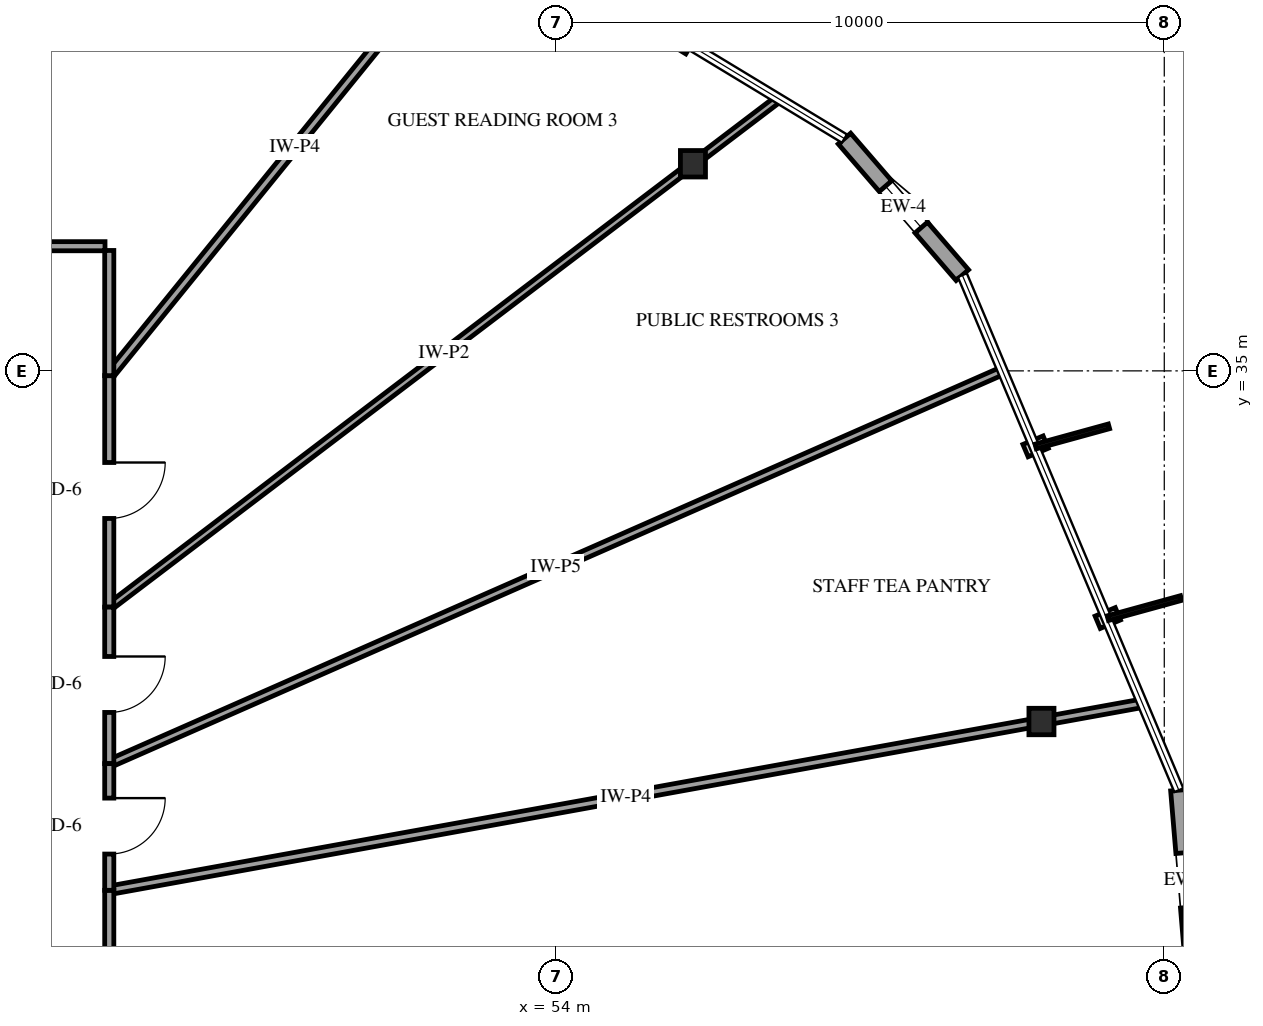
"""IFC4 building model, lengths in metres.
Left out: names, types, materials, properties, quantities, classifications, styles, units other than length and angle.
Written with IfcOpenShell. Run it as: python <this file> out.ifc"""

import sys

from ifc_helpers import new_model, si_unit, direction, frame, frame_2d, origin, origin_2d, place, context, subcontext, project, spatial, rectangle, i_section, extrude, element, fill, save


model = new_model("IFC4")
c1 = context("Model", 3, precision=1e-05, world=origin(), true_north=direction((0.0, 1.0)))
c2 = subcontext(c1, "Body", "Model", "MODEL_VIEW")
j1 = project(units=[si_unit("LENGTHUNIT", "METRE"), si_unit("PLANEANGLEUNIT", "RADIAN")], contexts=[c1])
p1 = place(None, origin())
s1 = spatial("IfcSite", under=j1, at=p1, CompositionType="ELEMENT")
p2 = place(p1, origin())
s2 = spatial("IfcBuilding", under=s1, at=p2, CompositionType="ELEMENT")
p3 = place(p2, frame((0.0, 0.0, 182.2)))
s3 = spatial("IfcBuildingStorey", under=s2, at=p3, CompositionType="ELEMENT", Elevation=182.2)
for number, where, z_axis, x_axis in (
    (1, (61.98, 29.234, 0.0), (0.0, 0.0, 1.0), (1.0, 0.0, 0.0)),
    (2, (56.249, 38.406, 0.0), (0.0, 0.0, 1.0), (1.0, 0.0, 0.0)),
):
    element("IfcColumn", number, at=place(p3, frame(where, z_axis=z_axis, x_axis=x_axis)), inside=s3, PredefinedType="COLUMN", context=c2, shape_type="SweptSolid", body=[
        extrude(i_section(OverallWidth=0.412, OverallDepth=0.435, WebThickness=0.036, FlangeThickness=0.057, FilletRadius=0.038, at=origin_2d()), origin(), (0.0, 0.0, 1.0), 3.6),
    ])
p4 = place(p3, frame((64.488, 25.148, 0.0), z_axis=(0.0, 0.0, 1.0), x_axis=(-0.083699323031, 0.996491055316, 0.0)))
e3 = element("IfcWall", 3, at=p4, inside=s3, PredefinedType="SOLIDWALL", context=c2, shape_type="SweptSolid", body=[
    extrude(rectangle(XDim=2.967, YDim=0.27, at=frame_2d((1.483, 0.0))), origin(), (0.0, 0.0, 1.0), 2.639),
])
p5 = place(p4, frame((1.033, 0.0, 0.75)))
e4 = element("IfcOpeningElement", 4, at=p5, cuts=e3, PredefinedType="OPENING", context=c2, shape_type="SweptSolid", body=[
    extrude(rectangle(XDim=0.9, YDim=1.5, at=frame_2d((0.45, 0.75))), frame((0.0, 0.145, 0.0), z_axis=(0.0, -1.0, 0.0), x_axis=(1.0, 0.0, 0.0)), (0.0, 0.0, 1.0), 0.29),
])
p6 = place(p3, frame((60.679, 36.574, 0.0), z_axis=(0.0, 0.0, 1.0), x_axis=(-0.653444154336, 0.756974726899, 0.0)))
e5 = element("IfcWall", 5, at=p6, inside=s3, PredefinedType="SOLIDWALL", context=c2, shape_type="SweptSolid", body=[
    extrude(rectangle(XDim=2.967, YDim=0.27, at=frame_2d((1.483, 0.0))), origin(), (0.0, 0.0, 1.0), 2.639),
])
p7 = place(p6, frame((1.033, 0.0, 0.75)))
e6 = element("IfcOpeningElement", 6, at=p7, cuts=e5, PredefinedType="OPENING", context=c2, shape_type="SweptSolid", body=[
    extrude(rectangle(XDim=0.9, YDim=1.5, at=frame_2d((0.45, 0.75))), frame((0.0, 0.145, 0.0), z_axis=(0.0, -1.0, 0.0), x_axis=(1.0, 0.0, 0.0)), (0.0, 0.0, 1.0), 0.29),
])
p8 = place(p3, frame((63.639, 29.534, 0.0), z_axis=(0.0, 0.0, 1.0), x_axis=(-0.984001996819, -0.1781574311, 0.0)))
e7 = element("IfcWall", 7, at=p8, inside=s3, PredefinedType="PARTITIONING", context=c2, shape_type="SweptSolid", body=[
    extrude(rectangle(XDim=17.265, YDim=0.14, at=frame_2d((8.633, 0.0))), origin(), (0.0, 0.0, 1.0), 2.555),
])
p9 = place(p3, frame((46.65, 28.541, 0.0), z_axis=(0.0, 0.0, 1.0), x_axis=(0.915378055005, 0.402595350712, 0.0)))
e8 = element("IfcWall", 8, at=p9, inside=s3, PredefinedType="PARTITIONING", context=c2, shape_type="SweptSolid", body=[
    extrude(rectangle(XDim=16.048, YDim=0.13, at=frame_2d((8.024, 0.0))), origin(), (0.0, 0.0, 1.0), 3.26),
])
p10 = place(p3, frame((46.65, 31.115, 0.0), z_axis=(0.0, 0.0, 1.0), x_axis=(0.796337772152, 0.604852174208, 0.0)))
e9 = element("IfcWall", 9, at=p10, inside=s3, PredefinedType="PARTITIONING", context=c2, shape_type="SweptSolid", body=[
    extrude(rectangle(XDim=13.823, YDim=0.12, at=frame_2d((6.912, 0.0))), origin(), (0.0, 0.0, 1.0), 2.638),
])
p11 = place(p3, frame((46.65, 26.458, 0.0), z_axis=(0.0, 0.0, 1.0), x_axis=(0.0, -1.0, 0.0)))
e10 = element("IfcWall", 10, at=p11, inside=s3, PredefinedType="PARTITIONING", context=c2, shape_type="SweptSolid", body=[
    extrude(rectangle(XDim=13.438, YDim=0.15, at=frame_2d((6.719, 0.0))), origin(), (0.0, 0.0, 1.0), 3.26),
])
p12 = place(p11, frame((6.244, 0.0, 0.0)))
e11 = element("IfcOpeningElement", 11, at=p12, cuts=e10, PredefinedType="OPENING", context=c2, shape_type="SweptSolid", body=[
    extrude(rectangle(XDim=0.92, YDim=2.12, at=frame_2d((0.46, 1.06))), frame((0.0, 0.085, 0.0), z_axis=(0.0, -1.0, 0.0), x_axis=(1.0, 0.0, 0.0)), (0.0, 0.0, 1.0), 0.17),
])
p13 = place(p3, frame((46.65, 34.921, 0.0), z_axis=(0.0, 0.0, 1.0), x_axis=(0.630069812672, 0.776538493031, 0.0)))
e12 = element("IfcWall", 12, at=p13, inside=s3, PredefinedType="PARTITIONING", context=c2, shape_type="SweptSolid", body=[
    extrude(rectangle(XDim=9.689, YDim=0.14, at=frame_2d((4.845, 0.0))), origin(), (0.0, 0.0, 1.0), 3.26),
])
p14 = place(p3, frame((43.86, 37.05, 0.0), z_axis=(0.0, 0.0, 1.0), x_axis=(0.400118177533, 0.916463553016, 0.0)))
e13 = element("IfcWall", 13, at=p14, inside=s3, PredefinedType="PARTITIONING", context=c2, shape_type="SweptSolid", body=[
    extrude(rectangle(XDim=7.77, YDim=0.13, at=frame_2d((3.885, 0.0))), origin(), (0.0, 0.0, 1.0), 2.555),
])
p15 = place(p3, frame((46.65, 34.921, 0.0), z_axis=(0.0, 0.0, 1.0), x_axis=(0.0, -1.0, 0.0)))
e14 = element("IfcWall", 14, at=p15, inside=s3, PredefinedType="PARTITIONING", context=c2, shape_type="SweptSolid", body=[
    extrude(rectangle(XDim=3.806, YDim=0.15, at=frame_2d((1.903, 0.0))), origin(), (0.0, 0.0, 1.0), 3.26),
])
p16 = place(p15, frame((1.428, 0.0, 0.0)))
e15 = element("IfcOpeningElement", 15, at=p16, cuts=e14, PredefinedType="OPENING", context=c2, shape_type="SweptSolid", body=[
    extrude(rectangle(XDim=0.92, YDim=2.12, at=frame_2d((0.46, 1.06))), frame((0.0, 0.085, 0.0), z_axis=(0.0, -1.0, 0.0), x_axis=(1.0, 0.0, 0.0)), (0.0, 0.0, 1.0), 0.17),
])
p17 = place(p3, frame((43.86, 37.05, 0.0), z_axis=(0.0, 0.0, 1.0), x_axis=(1.0, 0.0, 0.0)))
e16 = element("IfcWall", 16, at=p17, inside=s3, PredefinedType="PARTITIONING", context=c2, shape_type="SweptSolid", body=[
    extrude(rectangle(XDim=2.72, YDim=0.15, at=frame_2d((1.36, 0.0))), origin(), (0.0, 0.0, 1.0), 3.26),
])
p18 = place(p17, frame((0.885, 0.0, 0.0)))
e17 = element("IfcOpeningElement", 17, at=p18, cuts=e16, PredefinedType="OPENING", context=c2, shape_type="SweptSolid", body=[
    extrude(rectangle(XDim=0.92, YDim=2.12, at=frame_2d((0.46, 1.06))), frame((0.0, 0.085, 0.0), z_axis=(0.0, -1.0, 0.0), x_axis=(1.0, 0.0, 0.0)), (0.0, 0.0, 1.0), 0.17),
])
p19 = place(p3, frame((46.65, 31.115, 0.0), z_axis=(0.0, 0.0, 1.0), x_axis=(0.0, -1.0, 0.0)))
e18 = element("IfcWall", 18, at=p19, inside=s3, PredefinedType="PARTITIONING", context=c2, shape_type="SweptSolid", body=[
    extrude(rectangle(XDim=2.574, YDim=0.15, at=frame_2d((1.287, 0.0))), origin(), (0.0, 0.0, 1.0), 3.26),
])
p20 = place(p19, frame((0.812, 0.0, 0.0)))
e19 = element("IfcOpeningElement", 19, at=p20, cuts=e18, PredefinedType="OPENING", context=c2, shape_type="SweptSolid", body=[
    extrude(rectangle(XDim=0.92, YDim=2.12, at=frame_2d((0.46, 1.06))), frame((0.0, 0.085, 0.0), z_axis=(0.0, -1.0, 0.0), x_axis=(1.0, 0.0, 0.0)), (0.0, 0.0, 1.0), 0.17),
])
p21 = place(p3, frame((46.65, 28.541, 0.0), z_axis=(0.0, 0.0, 1.0), x_axis=(0.0, -1.0, 0.0)))
e20 = element("IfcWall", 20, at=p21, inside=s3, PredefinedType="PARTITIONING", context=c2, shape_type="SweptSolid", body=[
    extrude(rectangle(XDim=2.083, YDim=0.15, at=frame_2d((1.042, 0.0))), origin(), (0.0, 0.0, 1.0), 3.26),
])
p22 = place(p21, frame((0.567, 0.0, 0.0)))
e21 = element("IfcOpeningElement", 21, at=p22, cuts=e20, PredefinedType="OPENING", context=c2, shape_type="SweptSolid", body=[
    extrude(rectangle(XDim=0.92, YDim=2.12, at=frame_2d((0.46, 1.06))), frame((0.0, 0.085, 0.0), z_axis=(0.0, -1.0, 0.0), x_axis=(1.0, 0.0, 0.0)), (0.0, 0.0, 1.0), 0.17),
])
p23 = place(p3, frame((46.65, 36.98, 0.0), z_axis=(0.0, 0.0, 1.0), x_axis=(0.0, -1.0, 0.0)))
e22 = element("IfcWall", 22, at=p23, inside=s3, PredefinedType="PARTITIONING", context=c2, shape_type="SweptSolid", body=[
    extrude(rectangle(XDim=2.059, YDim=0.15, at=frame_2d((1.03, 0.0))), origin(), (0.0, 0.0, 1.0), 3.26),
])
p24 = place(p5, origin())
e23 = element("IfcWindow", 23, at=p24, inside=s3, PartitioningType="SINGLE_PANEL", PredefinedType="WINDOW", context=c2, shape_type="SweptSolid", body=[
    extrude(rectangle(XDim=0.9, YDim=1.5, at=frame_2d((0.45, 0.75))), frame((0.0, 0.03, 0.0), z_axis=(0.0, -1.0, 0.0), x_axis=(1.0, 0.0, 0.0)), (0.0, 0.0, 1.0), 0.06),
])
fill(e4, e23)
p25 = place(p7, origin())
e24 = element("IfcWindow", 24, at=p25, inside=s3, PartitioningType="SINGLE_PANEL", PredefinedType="WINDOW", context=c2, shape_type="SweptSolid", body=[
    extrude(rectangle(XDim=0.9, YDim=1.5, at=frame_2d((0.45, 0.75))), frame((0.0, 0.03, 0.0), z_axis=(0.0, -1.0, 0.0), x_axis=(1.0, 0.0, 0.0)), (0.0, 0.0, 1.0), 0.06),
])
fill(e6, e24)
p26 = place(p16, origin())
e25 = element("IfcDoor", 25, at=p26, inside=s3, OperationType="SINGLE_SWING_LEFT", PredefinedType="DOOR", context=c2, shape_type="SweptSolid", body=[
    extrude(rectangle(XDim=0.92, YDim=2.12, at=frame_2d((0.46, 1.06))), frame((0.0, 0.025, 0.0), z_axis=(0.0, -1.0, 0.0), x_axis=(1.0, 0.0, 0.0)), (0.0, 0.0, 1.0), 0.05),
])
fill(e15, e25)
p27 = place(p20, origin())
e26 = element("IfcDoor", 26, at=p27, inside=s3, OperationType="SINGLE_SWING_LEFT", PredefinedType="DOOR", context=c2, shape_type="SweptSolid", body=[
    extrude(rectangle(XDim=0.92, YDim=2.12, at=frame_2d((0.46, 1.06))), frame((0.0, 0.025, 0.0), z_axis=(0.0, -1.0, 0.0), x_axis=(1.0, 0.0, 0.0)), (0.0, 0.0, 1.0), 0.05),
])
fill(e19, e26)
p28 = place(p22, origin())
e27 = element("IfcDoor", 27, at=p28, inside=s3, OperationType="SINGLE_SWING_LEFT", PredefinedType="DOOR", context=c2, shape_type="SweptSolid", body=[
    extrude(rectangle(XDim=0.92, YDim=2.12, at=frame_2d((0.46, 1.06))), frame((0.0, 0.025, 0.0), z_axis=(0.0, -1.0, 0.0), x_axis=(1.0, 0.0, 0.0)), (0.0, 0.0, 1.0), 0.05),
])
fill(e21, e27)
save(model, sys.argv[1])
